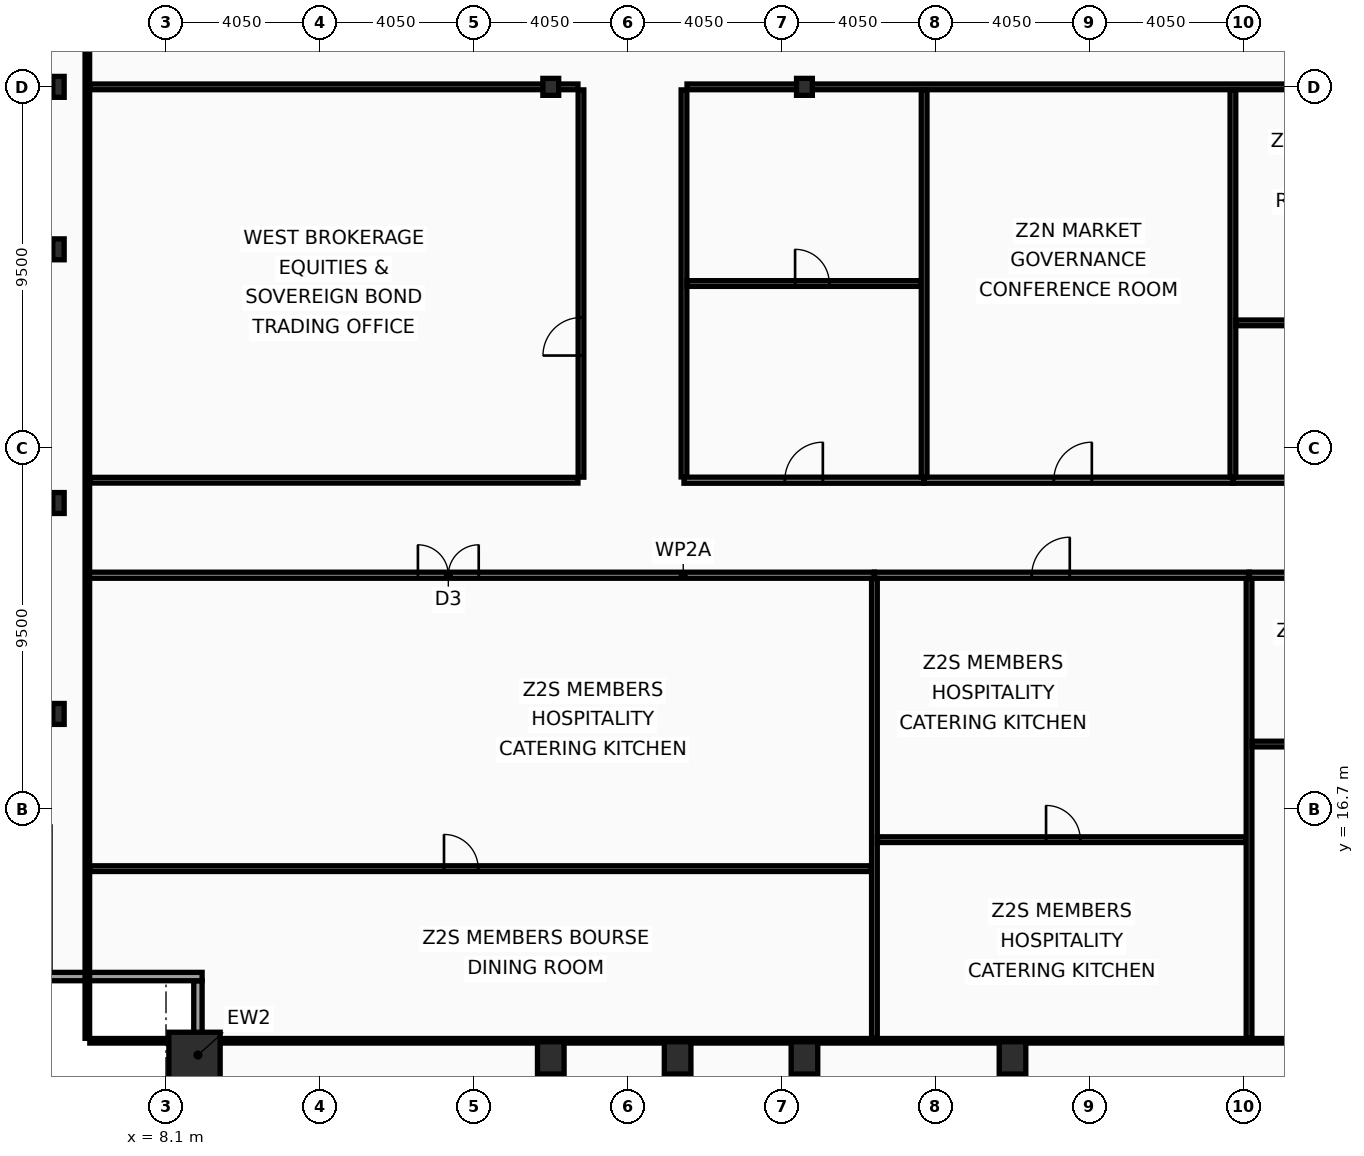
"""IFC4 building model, lengths in metres.
Left out: names, types, materials, properties, quantities, classifications, styles, units other than length and angle.
Written with IfcOpenShell. Run it as: python <this file> out.ifc"""

import sys

from ifc_helpers import new_model, si_unit, direction, frame, frame_2d, origin, origin_2d, place, context, subcontext, project, spatial, rectangle, hollow_rectangle, i_section, extrude, element, fill, save


model = new_model("IFC4")
c1 = context("Model", 3, precision=1e-05, world=origin(), true_north=direction((0.0, 1.0)))
c2 = subcontext(c1, "Body", "Model", "MODEL_VIEW")
j1 = project(units=[si_unit("LENGTHUNIT", "METRE"), si_unit("PLANEANGLEUNIT", "RADIAN")], contexts=[c1])
p1 = place(None, origin())
s1 = spatial("IfcSite", under=j1, at=p1, CompositionType="ELEMENT")
p2 = place(p1, origin())
s2 = spatial("IfcBuilding", under=s1, at=p2, CompositionType="ELEMENT")
p3 = place(p2, frame((0.0, 0.0, 168.6)))
s3 = spatial("IfcBuildingStorey", under=s2, at=p3, CompositionType="ELEMENT", Elevation=168.6)
p4 = place(p3, frame((8.85, 10.15, 0.0), z_axis=(0.0, 0.0, 1.0), x_axis=(1.0, 0.0, 0.0)))
e1 = element("IfcColumn", 1, at=p4, inside=s3, PredefinedType="COLUMN", context=c2, shape_type="SweptSolid", body=[
    extrude(hollow_rectangle(XDim=1.35, YDim=1.35, WallThickness=0.065, at=origin_2d()), origin(), (0.0, 0.0, 1.0), 3.6),
])
for number, where, z_axis, x_axis in (
    (2, (18.225, 10.15, 0.0), (0.0, 0.0, 1.0), (1.0, 0.0, 0.0)),
    (3, (21.562, 10.15, 0.0), (0.0, 0.0, 1.0), (1.0, 0.0, 0.0)),
    (4, (24.9, 10.15, 0.0), (0.0, 0.0, 1.0), (1.0, 0.0, 0.0)),
    (5, (30.375, 10.15, 0.0), (0.0, 0.0, 1.0), (1.0, 0.0, 0.0)),
):
    element("IfcColumn", number, at=place(p3, frame(where, z_axis=z_axis, x_axis=x_axis)), inside=s3, PredefinedType="COLUMN", context=c2, shape_type="SweptSolid", body=[
        extrude(hollow_rectangle(XDim=0.7, YDim=0.85, WallThickness=0.05, at=origin_2d()), origin(), (0.0, 0.0, 1.0), 3.6),
    ])
for number, where, z_axis, x_axis in (
    (6, (5.27, 19.2, 0.0), (0.0, 0.0, 1.0), (1.0, 0.0, 0.0)),
    (7, (5.27, 24.75, 0.0), (0.0, 0.0, 1.0), (1.0, 0.0, 0.0)),
    (8, (5.27, 31.425, 0.0), (0.0, 0.0, 1.0), (1.0, 0.0, 0.0)),
    (9, (5.27, 35.7, 0.0), (0.0, 0.0, 1.0), (1.0, 0.0, 0.0)),
):
    element("IfcColumn", number, at=place(p3, frame(where, z_axis=z_axis, x_axis=x_axis)), inside=s3, PredefinedType="COLUMN", context=c2, shape_type="SweptSolid", body=[
        extrude(i_section(OverallWidth=0.3, OverallDepth=0.55, WebThickness=0.015, FlangeThickness=0.029, at=origin_2d()), origin(), (0.0, 0.0, 1.0), 3.6),
    ])
for number, where, z_axis, x_axis in (
    (10, (18.225, 35.7, 0.0), (0.0, 0.0, 1.0), (1.0, 0.0, 0.0)),
    (11, (24.9, 35.7, 0.0), (0.0, 0.0, 1.0), (1.0, 0.0, 0.0)),
):
    element("IfcColumn", number, at=place(p3, frame(where, z_axis=z_axis, x_axis=x_axis)), inside=s3, PredefinedType="COLUMN", context=c2, shape_type="SweptSolid", body=[
        extrude(i_section(OverallWidth=0.416, OverallDepth=0.446, WebThickness=0.039, FlangeThickness=0.063, at=origin_2d()), origin(), (0.0, 0.0, 1.0), 3.6),
    ])
p5 = place(p3, frame((8.94, 8.27, 0.0), z_axis=(0.0, 0.0, 1.0), x_axis=(0.0, 1.0, 0.0)))
e12 = element("IfcWall", 12, at=p5, inside=s3, PredefinedType="SOLIDWALL", context=c2, shape_type="SweptSolid", body=[
    extrude(rectangle(XDim=3.91, YDim=0.22, at=frame_2d((1.955, 0.0))), origin(), (0.0, 0.0, 1.0), 2.77),
])
p6 = place(p3, frame((9.05, 12.29, 0.0), z_axis=(0.0, 0.0, 1.0), x_axis=(-1.0, 0.0, 0.0)))
e13 = element("IfcWall", 13, at=p6, inside=s3, PredefinedType="SOLIDWALL", context=c2, shape_type="SweptSolid", body=[
    extrude(rectangle(XDim=4.22, YDim=0.22, at=frame_2d((2.11, 0.0))), origin(), (0.0, 0.0, 1.0), 2.77),
])
p7 = place(p3, frame((6.03, 22.85, 0.0), z_axis=(0.0, 0.0, 1.0), x_axis=(1.0, 0.0, 0.0)))
e14 = element("IfcWall", 14, at=p7, inside=s3, PredefinedType="PARTITIONING", context=c2, shape_type="SweptSolid", body=[
    extrude(rectangle(XDim=20.711, YDim=0.16, at=frame_2d((10.356, 0.0))), origin(), (0.0, 0.0, 1.0), 2.67),
])
p8 = place(p7, frame((8.699, 0.0, 0.0)))
e15 = element("IfcOpeningElement", 15, at=p8, cuts=e14, PredefinedType="OPENING", context=c2, shape_type="SweptSolid", body=[
    extrude(rectangle(XDim=1.6, YDim=2.15, at=frame_2d((0.8, 1.075))), frame((0.0, 0.09, 0.0), z_axis=(0.0, -1.0, 0.0), x_axis=(1.0, 0.0, 0.0)), (0.0, 0.0, 1.0), 0.18),
])
p9 = place(p3, frame((6.095, 15.129, 0.0), z_axis=(0.0, 0.0, 1.0), x_axis=(1.0, 0.0, 0.0)))
e16 = element("IfcWall", 16, at=p9, inside=s3, PredefinedType="PARTITIONING", context=c2, shape_type="SweptSolid", body=[
    extrude(rectangle(XDim=20.567, YDim=0.15, at=frame_2d((10.283, 0.0))), origin(), (0.0, 0.0, 1.0), 2.67),
])
p10 = place(p9, frame((9.32, 0.0, 0.0)))
e17 = element("IfcOpeningElement", 17, at=p10, cuts=e16, PredefinedType="OPENING", context=c2, shape_type="SweptSolid", body=[
    extrude(rectangle(XDim=0.9, YDim=2.05, at=frame_2d((0.45, 1.025))), frame((0.0, 0.085, 0.0), z_axis=(0.0, -1.0, 0.0), x_axis=(1.0, 0.0, 0.0)), (0.0, 0.0, 1.0), 0.17),
])
p11 = place(p3, frame((26.741, 22.85, 0.0), z_axis=(0.0, 0.0, 1.0), x_axis=(1.0, 0.0, 0.0)))
e18 = element("IfcWall", 18, at=p11, inside=s3, PredefinedType="PARTITIONING", context=c2, shape_type="SweptSolid", body=[
    extrude(rectangle(XDim=9.858, YDim=0.16, at=frame_2d((4.929, 0.0))), origin(), (0.0, 0.0, 1.0), 2.67),
])
p12 = place(p11, frame((4.14, 0.0, 0.0)))
e19 = element("IfcOpeningElement", 19, at=p12, cuts=e18, PredefinedType="OPENING", context=c2, shape_type="SweptSolid", body=[
    extrude(rectangle(XDim=1.0, YDim=2.05, at=frame_2d((0.5, 1.025))), frame((0.0, 0.09, 0.0), z_axis=(0.0, -1.0, 0.0), x_axis=(1.0, 0.0, 0.0)), (0.0, 0.0, 1.0), 0.18),
])
p13 = place(p3, frame((26.741, 10.665, 0.0), z_axis=(0.0, 0.0, 1.0), x_axis=(0.0, 1.0, 0.0)))
e20 = element("IfcWall", 20, at=p13, inside=s3, PredefinedType="PARTITIONING", context=c2, shape_type="SweptSolid", body=[
    extrude(rectangle(XDim=12.1, YDim=0.15, at=frame_2d((6.05, 0.0))), origin(), (0.0, 0.0, 1.0), 2.87),
])
p14 = place(p3, frame((26.822, 15.892, 0.0), z_axis=(0.0, 0.0, 1.0), x_axis=(1.0, 0.0, 0.0)))
e21 = element("IfcWall", 21, at=p14, inside=s3, PredefinedType="PARTITIONING", context=c2, shape_type="SweptSolid", body=[
    extrude(rectangle(XDim=9.698, YDim=0.15, at=frame_2d((4.849, 0.0))), origin(), (0.0, 0.0, 1.0), 2.67),
])
p15 = place(p14, frame((4.436, 0.0, 0.0)))
e22 = element("IfcOpeningElement", 22, at=p15, cuts=e21, PredefinedType="OPENING", context=c2, shape_type="SweptSolid", body=[
    extrude(rectangle(XDim=0.9, YDim=2.05, at=frame_2d((0.45, 1.025))), frame((0.0, 0.085, 0.0), z_axis=(0.0, -1.0, 0.0), x_axis=(1.0, 0.0, 0.0)), (0.0, 0.0, 1.0), 0.17),
])
p16 = place(p3, frame((36.599, 22.85, 0.0), z_axis=(0.0, 0.0, 1.0), x_axis=(1.0, 0.0, 0.0)))
e23 = element("IfcWall", 23, at=p16, inside=s3, PredefinedType="PARTITIONING", context=c2, shape_type="SweptSolid", body=[
    extrude(rectangle(XDim=12.845, YDim=0.16, at=frame_2d((6.423, 0.0))), origin(), (0.0, 0.0, 1.0), 2.67),
])
p17 = place(p16, frame((5.395, 0.0, 0.0)))
e24 = element("IfcOpeningElement", 24, at=p17, cuts=e23, PredefinedType="OPENING", context=c2, shape_type="SweptSolid", body=[
    extrude(rectangle(XDim=1.0, YDim=2.05, at=frame_2d((0.5, 1.025))), frame((0.0, 0.09, 0.0), z_axis=(0.0, -1.0, 0.0), x_axis=(1.0, 0.0, 0.0)), (0.0, 0.0, 1.0), 0.18),
])
p18 = place(p3, frame((36.599, 10.665, 0.0), z_axis=(0.0, 0.0, 1.0), x_axis=(0.0, 1.0, 0.0)))
e25 = element("IfcWall", 25, at=p18, inside=s3, PredefinedType="PARTITIONING", context=c2, shape_type="SweptSolid", body=[
    extrude(rectangle(XDim=12.1, YDim=0.15, at=frame_2d((6.05, 0.0))), origin(), (0.0, 0.0, 1.0), 2.87),
])
p19 = place(p3, frame((36.679, 18.408, 0.0), z_axis=(0.0, 0.0, 1.0), x_axis=(1.0, 0.0, 0.0)))
e26 = element("IfcWall", 26, at=p19, inside=s3, PredefinedType="PARTITIONING", context=c2, shape_type="SweptSolid", body=[
    extrude(rectangle(XDim=12.685, YDim=0.15, at=frame_2d((6.343, 0.0))), origin(), (0.0, 0.0, 1.0), 2.67),
])
p20 = place(p19, frame((5.78, 0.0, 0.0)))
e27 = element("IfcOpeningElement", 27, at=p20, cuts=e26, PredefinedType="OPENING", context=c2, shape_type="SweptSolid", body=[
    extrude(rectangle(XDim=0.9, YDim=2.05, at=frame_2d((0.45, 1.025))), frame((0.0, 0.085, 0.0), z_axis=(0.0, -1.0, 0.0), x_axis=(1.0, 0.0, 0.0)), (0.0, 0.0, 1.0), 0.17),
])
p21 = place(p3, frame((19.02, 25.43, 0.0), z_axis=(0.0, 0.0, 1.0), x_axis=(0.0, 1.0, 0.0)))
e28 = element("IfcWall", 28, at=p21, inside=s3, PredefinedType="PARTITIONING", context=c2, shape_type="SweptSolid", body=[
    extrude(rectangle(XDim=10.19, YDim=0.15, at=frame_2d((5.095, 0.0))), origin(), (0.0, 0.0, 1.0), 2.87),
])
p22 = place(p21, frame((3.2, 0.0, 0.0)))
e29 = element("IfcOpeningElement", 29, at=p22, cuts=e28, PredefinedType="OPENING", context=c2, shape_type="SweptSolid", body=[
    extrude(rectangle(XDim=1.0, YDim=2.05, at=frame_2d((0.5, 1.025))), frame((0.0, 0.085, 0.0), z_axis=(0.0, -1.0, 0.0), x_axis=(1.0, 0.0, 0.0)), (0.0, 0.0, 1.0), 0.17),
])
for number, where, z_axis, x_axis in (
    (30, (6.095, 25.35, 0.0), (0.0, 0.0, 1.0), (1.0, 0.0, 0.0)),
    (31, (6.095, 35.7, 0.0), (0.0, 0.0, 1.0), (1.0, 0.0, 0.0)),
):
    element("IfcWall", number, at=place(p3, frame(where, z_axis=z_axis, x_axis=x_axis)), inside=s3, PredefinedType="PARTITIONING", context=c2, shape_type="SweptSolid", body=[
        extrude(rectangle(XDim=12.845, YDim=0.15, at=frame_2d((6.422, 0.0))), origin(), (0.0, 0.0, 1.0), 2.67),
    ])
p23 = place(p3, frame((21.73, 25.435, 0.0), z_axis=(0.0, 0.0, 1.0), x_axis=(0.0, 1.0, 0.0)))
e32 = element("IfcWall", 32, at=p23, inside=s3, PredefinedType="PARTITIONING", context=c2, shape_type="SweptSolid", body=[
    extrude(rectangle(XDim=10.185, YDim=0.15, at=frame_2d((5.093, 0.0))), origin(), (0.0, 0.0, 1.0), 2.87),
])
p24 = place(p3, frame((21.81, 35.7, 0.0), z_axis=(0.0, 0.0, 1.0), x_axis=(1.0, 0.0, 0.0)))
e33 = element("IfcWall", 33, at=p24, inside=s3, PredefinedType="PARTITIONING", context=c2, shape_type="SweptSolid", body=[
    extrude(rectangle(XDim=44.995, YDim=0.15, at=frame_2d((22.498, 0.0))), origin(), (0.0, 0.0, 1.0), 2.67),
])
p25 = place(p3, frame((21.73, 25.35, 0.0), z_axis=(0.0, 0.0, 1.0), x_axis=(1.0, 0.0, 0.0)))
e34 = element("IfcWall", 34, at=p25, inside=s3, PredefinedType="PARTITIONING", context=c2, shape_type="SweptSolid", body=[
    extrude(rectangle(XDim=6.32, YDim=0.16, at=frame_2d((3.16, 0.0))), origin(), (0.0, 0.0, 1.0), 2.67),
])
p26 = place(p25, frame((2.654, 0.0, 0.0)))
e35 = element("IfcOpeningElement", 35, at=p26, cuts=e34, PredefinedType="OPENING", context=c2, shape_type="SweptSolid", body=[
    extrude(rectangle(XDim=1.0, YDim=2.05, at=frame_2d((0.5, 1.025))), frame((0.0, 0.09, 0.0), z_axis=(0.0, -1.0, 0.0), x_axis=(1.0, 0.0, 0.0)), (0.0, 0.0, 1.0), 0.18),
])
p27 = place(p3, frame((21.81, 30.525, 0.0), z_axis=(0.0, 0.0, 1.0), x_axis=(1.0, 0.0, 0.0)))
e36 = element("IfcWall", 36, at=p27, inside=s3, PredefinedType="PARTITIONING", context=c2, shape_type="SweptSolid", body=[
    extrude(rectangle(XDim=6.159, YDim=0.15, at=frame_2d((3.08, 0.0))), origin(), (0.0, 0.0, 1.0), 2.67),
])
p28 = place(p27, frame((2.844, 0.0, 0.0)))
e37 = element("IfcOpeningElement", 37, at=p28, cuts=e36, PredefinedType="OPENING", context=c2, shape_type="SweptSolid", body=[
    extrude(rectangle(XDim=0.9, YDim=2.05, at=frame_2d((0.45, 1.025))), frame((0.0, 0.085, 0.0), z_axis=(0.0, -1.0, 0.0), x_axis=(1.0, 0.0, 0.0)), (0.0, 0.0, 1.0), 0.17),
])
p29 = place(p3, frame((28.05, 25.35, 0.0), z_axis=(0.0, 0.0, 1.0), x_axis=(1.0, 0.0, 0.0)))
e38 = element("IfcWall", 38, at=p29, inside=s3, PredefinedType="PARTITIONING", context=c2, shape_type="SweptSolid", body=[
    extrude(rectangle(XDim=8.125, YDim=0.16, at=frame_2d((4.062, 0.0))), origin(), (0.0, 0.0, 1.0), 2.67),
])
p30 = place(p29, frame((3.413, 0.0, 0.0)))
e39 = element("IfcOpeningElement", 39, at=p30, cuts=e38, PredefinedType="OPENING", context=c2, shape_type="SweptSolid", body=[
    extrude(rectangle(XDim=1.0, YDim=2.05, at=frame_2d((0.5, 1.025))), frame((0.0, 0.09, 0.0), z_axis=(0.0, -1.0, 0.0), x_axis=(1.0, 0.0, 0.0)), (0.0, 0.0, 1.0), 0.18),
])
p31 = place(p3, frame((28.05, 25.435, 0.0), z_axis=(0.0, 0.0, 1.0), x_axis=(0.0, 1.0, 0.0)))
e40 = element("IfcWall", 40, at=p31, inside=s3, PredefinedType="PARTITIONING", context=c2, shape_type="SweptSolid", body=[
    extrude(rectangle(XDim=10.185, YDim=0.15, at=frame_2d((5.093, 0.0))), origin(), (0.0, 0.0, 1.0), 2.87),
])
p32 = place(p3, frame((36.175, 25.35, 0.0), z_axis=(0.0, 0.0, 1.0), x_axis=(1.0, 0.0, 0.0)))
e41 = element("IfcWall", 41, at=p32, inside=s3, PredefinedType="PARTITIONING", context=c2, shape_type="SweptSolid", body=[
    extrude(rectangle(XDim=7.222, YDim=0.16, at=frame_2d((3.611, 0.0))), origin(), (0.0, 0.0, 1.0), 2.67),
])
p33 = place(p32, frame((3.033, 0.0, 0.0)))
e42 = element("IfcOpeningElement", 42, at=p33, cuts=e41, PredefinedType="OPENING", context=c2, shape_type="SweptSolid", body=[
    extrude(rectangle(XDim=1.0, YDim=2.05, at=frame_2d((0.5, 1.025))), frame((0.0, 0.09, 0.0), z_axis=(0.0, -1.0, 0.0), x_axis=(1.0, 0.0, 0.0)), (0.0, 0.0, 1.0), 0.18),
])
p34 = place(p3, frame((36.175, 25.435, 0.0), z_axis=(0.0, 0.0, 1.0), x_axis=(0.0, 1.0, 0.0)))
e43 = element("IfcWall", 43, at=p34, inside=s3, PredefinedType="PARTITIONING", context=c2, shape_type="SweptSolid", body=[
    extrude(rectangle(XDim=10.185, YDim=0.15, at=frame_2d((5.093, 0.0))), origin(), (0.0, 0.0, 1.0), 2.87),
])
p35 = place(p3, frame((36.255, 29.49, 0.0), z_axis=(0.0, 0.0, 1.0), x_axis=(1.0, 0.0, 0.0)))
e44 = element("IfcWall", 44, at=p35, inside=s3, PredefinedType="PARTITIONING", context=c2, shape_type="SweptSolid", body=[
    extrude(rectangle(XDim=7.062, YDim=0.15, at=frame_2d((3.531, 0.0))), origin(), (0.0, 0.0, 1.0), 2.67),
])
p36 = place(p35, frame((3.25, 0.0, 0.0)))
e45 = element("IfcOpeningElement", 45, at=p36, cuts=e44, PredefinedType="OPENING", context=c2, shape_type="SweptSolid", body=[
    extrude(rectangle(XDim=0.9, YDim=2.05, at=frame_2d((0.45, 1.025))), frame((0.0, 0.085, 0.0), z_axis=(0.0, -1.0, 0.0), x_axis=(1.0, 0.0, 0.0)), (0.0, 0.0, 1.0), 0.17),
])
p37 = place(p3, frame((6.03, 10.665, 0.0), z_axis=(0.0, 0.0, 1.0), x_axis=(0.0, 1.0, 0.0)))
e46 = element("IfcWall", 46, at=p37, inside=s3, PredefinedType="PARTITIONING", context=c2, shape_type="SweptSolid", body=[
    extrude(rectangle(XDim=42.11, YDim=0.12, at=frame_2d((21.055, 0.0))), origin(), (0.0, 0.0, 1.0), 2.67),
])
p38 = place(p3, frame((6.095, 10.6, 0.0), z_axis=(0.0, 0.0, 1.0), x_axis=(1.0, 0.0, 0.0)))
e47 = element("IfcWall", 47, at=p38, inside=s3, PredefinedType="PARTITIONING", context=c2, shape_type="SweptSolid", body=[
    extrude(rectangle(XDim=60.71, YDim=0.12, at=frame_2d((30.355, 0.0))), origin(), (0.0, 0.0, 1.0), 2.67),
])
p39 = place(p8, origin())
e48 = element("IfcDoor", 48, at=p39, inside=s3, OperationType="DOUBLE_DOOR_SINGLE_SWING", PredefinedType="DOOR", context=c2, shape_type="SweptSolid", body=[
    extrude(rectangle(XDim=1.6, YDim=2.15, at=frame_2d((0.8, 1.075))), frame((0.0, 0.025, 0.0), z_axis=(0.0, -1.0, 0.0), x_axis=(1.0, 0.0, 0.0)), (0.0, 0.0, 1.0), 0.05),
])
fill(e15, e48)
p40 = place(p10, origin())
e49 = element("IfcDoor", 49, at=p40, inside=s3, OperationType="SINGLE_SWING_LEFT", PredefinedType="DOOR", context=c2, shape_type="SweptSolid", body=[
    extrude(rectangle(XDim=0.9, YDim=2.05, at=frame_2d((0.45, 1.025))), frame((0.0, 0.025, 0.0), z_axis=(0.0, -1.0, 0.0), x_axis=(1.0, 0.0, 0.0)), (0.0, 0.0, 1.0), 0.05),
])
fill(e17, e49)
p41 = place(p12, origin())
e50 = element("IfcDoor", 50, at=p41, inside=s3, OperationType="SINGLE_SWING_RIGHT", PredefinedType="DOOR", context=c2, shape_type="SweptSolid", body=[
    extrude(rectangle(XDim=1.0, YDim=2.05, at=frame_2d((0.5, 1.025))), frame((0.0, 0.025, 0.0), z_axis=(0.0, -1.0, 0.0), x_axis=(1.0, 0.0, 0.0)), (0.0, 0.0, 1.0), 0.05),
])
fill(e19, e50)
p42 = place(p15, origin())
e51 = element("IfcDoor", 51, at=p42, inside=s3, OperationType="SINGLE_SWING_LEFT", PredefinedType="DOOR", context=c2, shape_type="SweptSolid", body=[
    extrude(rectangle(XDim=0.9, YDim=2.05, at=frame_2d((0.45, 1.025))), frame((0.0, 0.025, 0.0), z_axis=(0.0, -1.0, 0.0), x_axis=(1.0, 0.0, 0.0)), (0.0, 0.0, 1.0), 0.05),
])
fill(e22, e51)
p43 = place(p22, origin())
e52 = element("IfcDoor", 52, at=p43, inside=s3, OperationType="SINGLE_SWING_LEFT", PredefinedType="DOOR", context=c2, shape_type="SweptSolid", body=[
    extrude(rectangle(XDim=1.0, YDim=2.05, at=frame_2d((0.5, 1.025))), frame((0.0, 0.025, 0.0), z_axis=(0.0, -1.0, 0.0), x_axis=(1.0, 0.0, 0.0)), (0.0, 0.0, 1.0), 0.05),
])
fill(e29, e52)
p44 = place(p26, origin())
e53 = element("IfcDoor", 53, at=p44, inside=s3, OperationType="SINGLE_SWING_RIGHT", PredefinedType="DOOR", context=c2, shape_type="SweptSolid", body=[
    extrude(rectangle(XDim=1.0, YDim=2.05, at=frame_2d((0.5, 1.025))), frame((0.0, 0.025, 0.0), z_axis=(0.0, -1.0, 0.0), x_axis=(1.0, 0.0, 0.0)), (0.0, 0.0, 1.0), 0.05),
])
fill(e35, e53)
p45 = place(p28, origin())
e54 = element("IfcDoor", 54, at=p45, inside=s3, OperationType="SINGLE_SWING_LEFT", PredefinedType="DOOR", context=c2, shape_type="SweptSolid", body=[
    extrude(rectangle(XDim=0.9, YDim=2.05, at=frame_2d((0.45, 1.025))), frame((0.0, 0.025, 0.0), z_axis=(0.0, -1.0, 0.0), x_axis=(1.0, 0.0, 0.0)), (0.0, 0.0, 1.0), 0.05),
])
fill(e37, e54)
p46 = place(p30, origin())
e55 = element("IfcDoor", 55, at=p46, inside=s3, OperationType="SINGLE_SWING_RIGHT", PredefinedType="DOOR", context=c2, shape_type="SweptSolid", body=[
    extrude(rectangle(XDim=1.0, YDim=2.05, at=frame_2d((0.5, 1.025))), frame((0.0, 0.025, 0.0), z_axis=(0.0, -1.0, 0.0), x_axis=(1.0, 0.0, 0.0)), (0.0, 0.0, 1.0), 0.05),
])
fill(e39, e55)
save(model, sys.argv[1])
